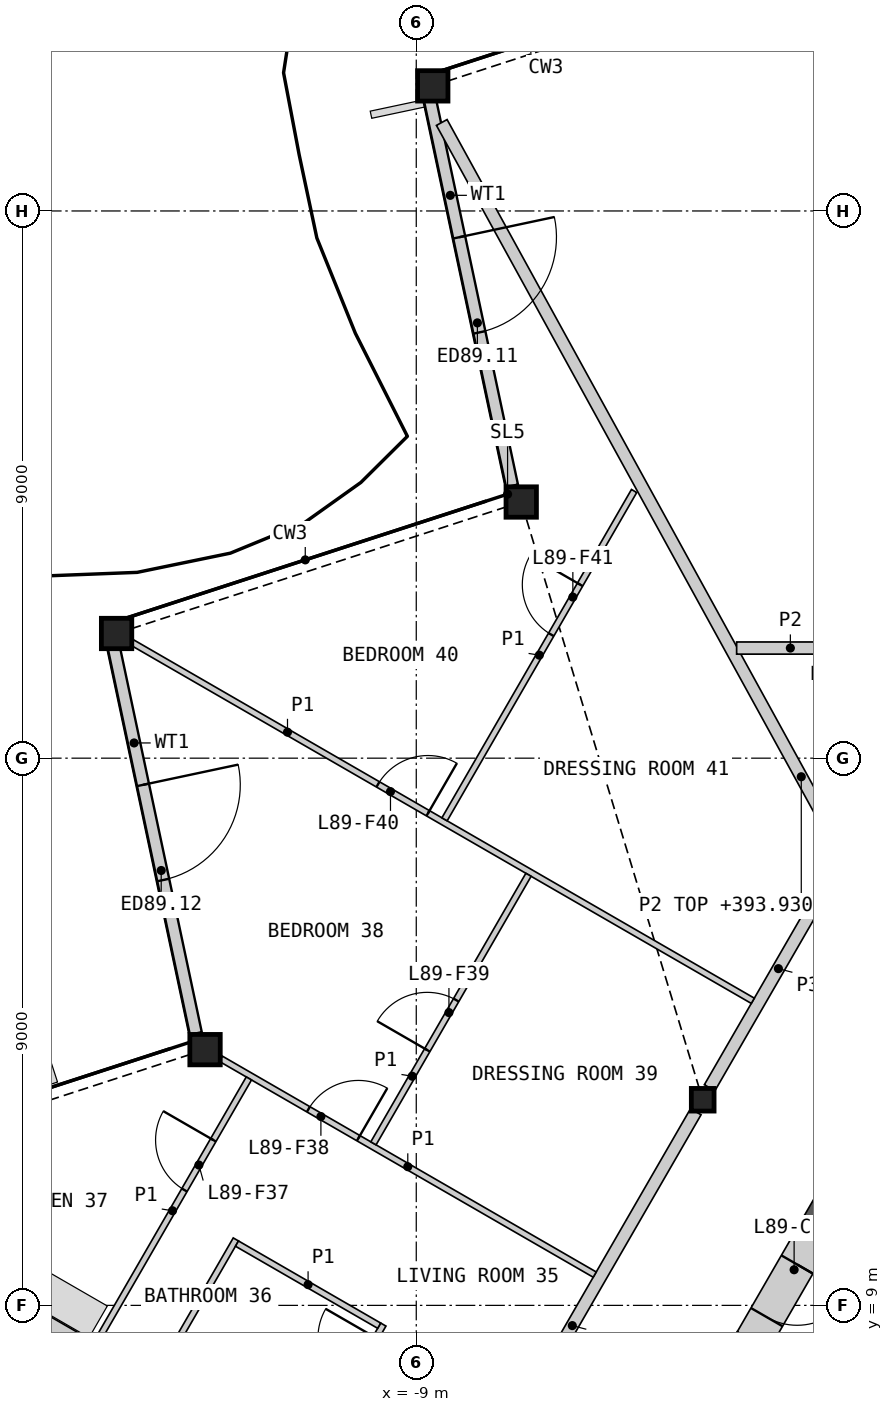
"""IFC4 building model, lengths in metres.
Left out: names, types, materials, properties, quantities, classifications, styles, units other than length and angle.
Written with IfcOpenShell. Run it as: python <this file> out.ifc"""

import sys

from ifc_helpers import new_model, si_unit, direction, frame, frame_2d, origin, origin_2d, place, context, subcontext, project, spatial, rectangle, hollow_rectangle, i_section, extrude, element, fill, save


model = new_model("IFC4")
c1 = context("Model", 3, precision=1e-05, world=origin(), true_north=direction((0.0, 1.0)))
c2 = subcontext(c1, "Body", "Model", "MODEL_VIEW")
j1 = project(units=[si_unit("LENGTHUNIT", "METRE"), si_unit("PLANEANGLEUNIT", "RADIAN")], contexts=[c1])
p1 = place(None, origin())
s1 = spatial("IfcSite", under=j1, at=p1, CompositionType="ELEMENT")
p2 = place(p1, origin())
s2 = spatial("IfcBuilding", under=s1, at=p2, CompositionType="ELEMENT")
p3 = place(p2, frame((0.0, 0.0, 391.6)))
s3 = spatial("IfcBuildingStorey", under=s2, at=p3, CompositionType="ELEMENT", Elevation=391.6)
for number, where, z_axis, x_axis in (
    (1, (-8.729, 29.057, 0.0), (0.0, 0.0, 1.0), (1.0, 0.0, 0.0)),
    (2, (-7.274, 22.213, 0.0), (0.0, 0.0, 1.0), (1.0, 0.0, 0.0)),
    (3, (-13.929, 20.051, 0.0), (0.0, 0.0, 1.0), (1.0, 0.0, 0.0)),
    (4, (-12.474, 13.206, 0.0), (0.0, 0.0, 1.0), (1.0, 0.0, 0.0)),
):
    element("IfcColumn", number, at=place(p3, frame(where, z_axis=z_axis, x_axis=x_axis)), inside=s3, PredefinedType="COLUMN", context=c2, shape_type="SweptSolid", body=[
        extrude(hollow_rectangle(XDim=0.5, YDim=0.5, WallThickness=0.03, at=origin_2d()), origin(), (0.0, 0.0, 1.0), 3.4),
    ])
p4 = place(p3, frame((-4.289, 12.382, 0.0), z_axis=(0.0, 0.0, 1.0), x_axis=(1.0, 0.0, 0.0)))
e5 = element("IfcColumn", 5, at=p4, inside=s3, PredefinedType="COLUMN", context=c2, shape_type="SweptSolid", body=[
    extrude(i_section(OverallWidth=0.374, OverallDepth=0.372, WebThickness=0.016, FlangeThickness=0.026, at=origin_2d()), origin(), (0.0, 0.0, 1.0), 3.4),
])
p5 = place(p3, frame((-8.779, 28.85, 0.0), z_axis=(0.0, 0.0, 1.0), x_axis=(0.207910765171, -0.978147797486, 0.0)))
e6 = element("IfcWall", 6, at=p5, inside=s3, PredefinedType="SOLIDWALL", context=c2, shape_type="SweptSolid", body=[
    extrude(rectangle(XDim=6.512, YDim=0.2, at=frame_2d((3.256, 0.0))), origin(), (0.0, 0.0, 1.0), 2.634),
])
p6 = place(p5, frame((2.333, 0.0, 0.0)))
e7 = element("IfcOpeningElement", 7, at=p6, cuts=e6, PredefinedType="OPENING", context=c2, shape_type="SweptSolid", body=[
    extrude(rectangle(XDim=1.6, YDim=2.25, at=frame_2d((0.8, 1.125))), frame((0.0, 0.11, 0.0), z_axis=(0.0, -1.0, 0.0), x_axis=(1.0, 0.0, 0.0)), (0.0, 0.0, 1.0), 0.22),
])
p7 = place(p3, frame((-13.979, 19.843, 0.0), z_axis=(0.0, 0.0, 1.0), x_axis=(0.207910765171, -0.978147797486, 0.0)))
e8 = element("IfcWall", 8, at=p7, inside=s3, PredefinedType="SOLIDWALL", context=c2, shape_type="SweptSolid", body=[
    extrude(rectangle(XDim=6.512, YDim=0.2, at=frame_2d((3.256, 0.0))), origin(), (0.0, 0.0, 1.0), 2.634),
])
p8 = place(p7, frame((2.333, 0.0, 0.0)))
e9 = element("IfcOpeningElement", 9, at=p8, cuts=e8, PredefinedType="OPENING", context=c2, shape_type="SweptSolid", body=[
    extrude(rectangle(XDim=1.6, YDim=2.25, at=frame_2d((0.8, 1.125))), frame((0.0, 0.11, 0.0), z_axis=(0.0, -1.0, 0.0), x_axis=(1.0, 0.0, 0.0)), (0.0, 0.0, 1.0), 0.22),
])
p9 = place(p3, frame((-3.461, 8.417, 0.0), z_axis=(0.0, 0.0, 1.0), x_axis=(-0.50000391502, -0.866023143435, 0.0)))
e10 = element("IfcWall", 10, at=p9, inside=s3, PredefinedType="SHEAR", context=c2, shape_type="SweptSolid", body=[
    extrude(rectangle(XDim=7.759, YDim=0.6, at=frame_2d((3.879, 0.0))), origin(), (0.0, 0.0, 1.0), 3.1),
])
p10 = place(p3, frame((-1.59, 11.658, 0.0), z_axis=(0.0, 0.0, 1.0), x_axis=(-0.500037594623, -0.866003697431, 0.0)))
e11 = element("IfcWall", 11, at=p10, inside=s3, PredefinedType="SHEAR", context=c2, shape_type="SweptSolid", body=[
    extrude(rectangle(XDim=1.542, YDim=0.6, at=frame_2d((0.771, 0.0))), origin(), (0.0, 0.0, 1.0), 3.1),
])
p11 = place(p3, frame((-2.361, 10.322, 0.0), z_axis=(0.0, 0.0, 1.0), x_axis=(-0.499946605688, -0.86605622881, 0.0)))
e12 = element("IfcWall", 12, at=p11, inside=s3, PredefinedType="SHEAR", context=c2, shape_type="SweptSolid", body=[
    extrude(rectangle(XDim=2.2, YDim=0.6, at=frame_2d((1.1, 0.0))), origin(), (0.0, 0.0, 1.0), 3.1),
])
p12 = place(p11, frame((0.75, 0.0, 0.0)))
e13 = element("IfcOpeningElement", 13, at=p12, cuts=e12, PredefinedType="OPENING", context=c2, shape_type="SweptSolid", body=[
    extrude(rectangle(XDim=1.0, YDim=2.1, at=frame_2d((0.5, 1.05))), frame((0.0, 0.31, 0.0), z_axis=(0.0, -1.0, 0.0), x_axis=(1.0, 0.0, 0.0)), (0.0, 0.0, 1.0), 0.62),
])
p13 = place(p3, frame((-8.465, 5.15, 0.0), z_axis=(0.0, 0.0, 1.0), x_axis=(0.499992155518, 0.866029932751, 0.0)))
e14 = element("IfcWall", 14, at=p13, inside=s3, PredefinedType="PARTITIONING", context=c2, shape_type="SweptSolid", body=[
    extrude(rectangle(XDim=8.123, YDim=0.2, at=frame_2d((4.062, 0.0))), origin(), (0.0, 0.0, 1.0), 3.1),
])
p14 = place(p13, frame((1.956, 0.0, 0.0)))
e15 = element("IfcOpeningElement", 15, at=p14, cuts=e14, PredefinedType="OPENING", context=c2, shape_type="SweptSolid", body=[
    extrude(rectangle(XDim=1.0, YDim=2.1, at=frame_2d((0.5, 1.05))), frame((0.0, 0.11, 0.0), z_axis=(0.0, -1.0, 0.0), x_axis=(1.0, 0.0, 0.0)), (0.0, 0.0, 1.0), 0.22),
])
p15 = place(p3, frame((-18.869, 10.894, 0.0), z_axis=(0.0, 0.0, 1.0), x_axis=(0.866023139795, -0.500003921324, 0.0)))
e16 = element("IfcWall", 16, at=p15, inside=s3, PredefinedType="PARTITIONING", context=c2, shape_type="SweptSolid", body=[
    extrude(rectangle(XDim=6.332, YDim=0.25, at=frame_2d((3.166, 0.0))), origin(), (0.0, 0.0, 1.0), 2.33),
])
p16 = place(p3, frame((-4.176, 12.579, 0.0), z_axis=(0.0, 0.0, 1.0), x_axis=(0.499974648164, 0.866040040179, 0.0)))
e17 = element("IfcWall", 17, at=p16, inside=s3, PredefinedType="PARTITIONING", context=c2, shape_type="SweptSolid", body=[
    extrude(rectangle(XDim=4.525, YDim=0.2, at=frame_2d((2.263, 0.0))), origin(), (0.0, 0.0, 1.0), 3.1),
])
p17 = place(p3, frame((-8.581, 28.455, 0.0), z_axis=(0.0, 0.0, 1.0), x_axis=(0.481551865547, -0.876417594979, 0.0)))
e18 = element("IfcWall", 18, at=p17, inside=s3, PredefinedType="PARTITIONING", context=c2, shape_type="SweptSolid", body=[
    extrude(rectangle(XDim=13.643, YDim=0.2, at=frame_2d((6.821, 0.0))), origin(), (0.0, 0.0, 1.0), 2.33),
])
p18 = place(p3, frame((-3.731, 19.811, 0.0), z_axis=(0.0, 0.0, 1.0), x_axis=(1.0, 0.0, 0.0)))
e19 = element("IfcWall", 19, at=p18, inside=s3, PredefinedType="PARTITIONING", context=c2, shape_type="SweptSolid", body=[
    extrude(rectangle(XDim=3.534, YDim=0.2, at=frame_2d((1.767, 0.0))), origin(), (0.0, 0.0, 1.0), 2.33),
])
p19 = place(p18, frame((1.396, 0.0, 0.0)))
e20 = element("IfcOpeningElement", 20, at=p19, cuts=e19, PredefinedType="OPENING", context=c2, shape_type="SweptSolid", body=[
    extrude(rectangle(XDim=0.95, YDim=2.1, at=frame_2d((0.475, 1.05))), frame((0.0, 0.11, 0.0), z_axis=(0.0, -1.0, 0.0), x_axis=(1.0, 0.0, 0.0)), (0.0, 0.0, 1.0), 0.22),
])
p20 = place(p3, frame((-13.669, 19.9, 0.0), z_axis=(0.0, 0.0, 1.0), x_axis=(0.866032376801, -0.499987922186, 0.0)))
e21 = element("IfcWall", 21, at=p20, inside=s3, PredefinedType="PARTITIONING", context=c2, shape_type="SweptSolid", body=[
    extrude(rectangle(XDim=11.782, YDim=0.1, at=frame_2d((5.891, 0.0))), origin(), (0.0, 0.0, 1.0), 2.33),
])
p21 = place(p20, frame((4.664, 0.0, 0.0)))
e22 = element("IfcOpeningElement", 22, at=p21, cuts=e21, PredefinedType="OPENING", context=c2, shape_type="SweptSolid", body=[
    extrude(rectangle(XDim=0.95, YDim=2.1, at=frame_2d((0.475, 1.05))), frame((0.0, 0.06, 0.0), z_axis=(0.0, -1.0, 0.0), x_axis=(1.0, 0.0, 0.0)), (0.0, 0.0, 1.0), 0.12),
])
p22 = place(p3, frame((-12.214, 13.056, 0.0), z_axis=(0.0, 0.0, 1.0), x_axis=(0.866018949465, -0.500011179042, 0.0)))
e23 = element("IfcWall", 23, at=p22, inside=s3, PredefinedType="PARTITIONING", context=c2, shape_type="SweptSolid", body=[
    extrude(rectangle(XDim=7.1, YDim=0.1, at=frame_2d((3.55, 0.0))), origin(), (0.0, 0.0, 1.0), 2.33),
])
p23 = place(p22, frame((1.663, 0.0, 0.0)))
e24 = element("IfcOpeningElement", 24, at=p23, cuts=e23, PredefinedType="OPENING", context=c2, shape_type="SweptSolid", body=[
    extrude(rectangle(XDim=0.95, YDim=2.1, at=frame_2d((0.475, 1.05))), frame((0.0, 0.06, 0.0), z_axis=(0.0, -1.0, 0.0), x_axis=(1.0, 0.0, 0.0)), (0.0, 0.0, 1.0), 0.12),
])
p24 = place(p3, frame((-8.535, 16.994, 0.0), z_axis=(0.0, 0.0, 1.0), x_axis=(0.499975529996, 0.866039531087, 0.0)))
e25 = element("IfcWall", 25, at=p24, inside=s3, PredefinedType="PARTITIONING", context=c2, shape_type="SweptSolid", body=[
    extrude(rectangle(XDim=6.235, YDim=0.1, at=frame_2d((3.118, 0.0))), origin(), (0.0, 0.0, 1.0), 2.33),
])
p25 = place(p24, frame((3.508, 0.0, 0.0)))
e26 = element("IfcOpeningElement", 26, at=p25, cuts=e25, PredefinedType="OPENING", context=c2, shape_type="SweptSolid", body=[
    extrude(rectangle(XDim=0.95, YDim=2.1, at=frame_2d((0.475, 1.05))), frame((0.0, 0.06, 0.0), z_axis=(0.0, -1.0, 0.0), x_axis=(1.0, 0.0, 0.0)), (0.0, 0.0, 1.0), 0.12),
])
p26 = place(p3, frame((-14.717, 5.321, 0.0), z_axis=(0.0, 0.0, 1.0), x_axis=(0.500015767406, 0.866016300277, 0.0)))
e27 = element("IfcWall", 27, at=p26, inside=s3, PredefinedType="PARTITIONING", context=c2, shape_type="SweptSolid", body=[
    extrude(rectangle(XDim=5.5, YDim=0.1, at=frame_2d((2.75, 0.0))), origin(), (0.0, 0.0, 1.0), 2.33),
])
p27 = place(p3, frame((-12.292, 3.921, 0.0), z_axis=(0.0, 0.0, 1.0), x_axis=(0.499996545922, 0.866027397988, 0.0)))
e28 = element("IfcWall", 28, at=p27, inside=s3, PredefinedType="PARTITIONING", context=c2, shape_type="SweptSolid", body=[
    extrude(rectangle(XDim=5.5, YDim=0.1, at=frame_2d((2.75, 0.0))), origin(), (0.0, 0.0, 1.0), 2.33),
])
p28 = place(p27, frame((4.3, 0.0, 0.0)))
e29 = element("IfcOpeningElement", 29, at=p28, cuts=e28, PredefinedType="OPENING", context=c2, shape_type="SweptSolid", body=[
    extrude(rectangle(XDim=0.95, YDim=2.1, at=frame_2d((0.475, 1.05))), frame((0.0, 0.06, 0.0), z_axis=(0.0, -1.0, 0.0), x_axis=(1.0, 0.0, 0.0)), (0.0, 0.0, 1.0), 0.12),
])
p29 = place(p27, frame((1.465, 0.0, 0.0)))
e30 = element("IfcOpeningElement", 30, at=p29, cuts=e28, PredefinedType="OPENING", context=c2, shape_type="SweptSolid", body=[
    extrude(rectangle(XDim=0.95, YDim=2.1, at=frame_2d((0.475, 1.05))), frame((0.0, 0.06, 0.0), z_axis=(0.0, -1.0, 0.0), x_axis=(1.0, 0.0, 0.0)), (0.0, 0.0, 1.0), 0.12),
])
p30 = place(p3, frame((-9.704, 11.665, 0.0), z_axis=(0.0, 0.0, 1.0), x_axis=(0.499984882974, 0.866034131428, 0.0)))
e31 = element("IfcWall", 31, at=p30, inside=s3, PredefinedType="PARTITIONING", context=c2, shape_type="SweptSolid", body=[
    extrude(rectangle(XDim=5.1, YDim=0.1, at=frame_2d((2.55, 0.0))), origin(), (0.0, 0.0, 1.0), 2.33),
])
p31 = place(p30, frame((1.771, 0.0, 0.0)))
e32 = element("IfcOpeningElement", 32, at=p31, cuts=e31, PredefinedType="OPENING", context=c2, shape_type="SweptSolid", body=[
    extrude(rectangle(XDim=0.95, YDim=2.1, at=frame_2d((0.475, 1.05))), frame((0.0, 0.06, 0.0), z_axis=(0.0, -1.0, 0.0), x_axis=(1.0, 0.0, 0.0)), (0.0, 0.0, 1.0), 0.12),
])
p32 = place(p3, frame((-14.265, 8.38, 0.0), z_axis=(0.0, 0.0, 1.0), x_axis=(0.500026652407, 0.866010015463, 0.0)))
e33 = element("IfcWall", 33, at=p32, inside=s3, PredefinedType="PARTITIONING", context=c2, shape_type="SweptSolid", body=[
    extrude(rectangle(XDim=5.025, YDim=0.1, at=frame_2d((2.513, 0.0))), origin(), (0.0, 0.0, 1.0), 2.33),
])
p33 = place(p32, frame((2.906, 0.0, 0.0)))
e34 = element("IfcOpeningElement", 34, at=p33, cuts=e33, PredefinedType="OPENING", context=c2, shape_type="SweptSolid", body=[
    extrude(rectangle(XDim=0.95, YDim=2.1, at=frame_2d((0.475, 1.05))), frame((0.0, 0.06, 0.0), z_axis=(0.0, -1.0, 0.0), x_axis=(1.0, 0.0, 0.0)), (0.0, 0.0, 1.0), 0.12),
])
p34 = place(p3, frame((-11.948, 10.016, 0.0), z_axis=(0.0, 0.0, 1.0), x_axis=(0.86599734893, -0.500048589285, 0.0)))
e35 = element("IfcWall", 35, at=p34, inside=s3, PredefinedType="PARTITIONING", context=c2, shape_type="SweptSolid", body=[
    extrude(rectangle(XDim=2.7, YDim=0.1, at=frame_2d((1.35, 0.0))), origin(), (0.0, 0.0, 1.0), 2.33),
])
p35 = place(p6, origin())
e36 = element("IfcDoor", 36, at=p35, inside=s3, OperationType="DOUBLE_DOOR_SINGLE_SWING", PredefinedType="DOOR", context=c2, shape_type="SweptSolid", body=[
    extrude(rectangle(XDim=1.6, YDim=2.25, at=frame_2d((0.8, 1.125))), frame((0.0, 0.025, 0.0), z_axis=(0.0, -1.0, 0.0), x_axis=(1.0, 0.0, 0.0)), (0.0, 0.0, 1.0), 0.05),
])
fill(e7, e36)
p36 = place(p8, origin())
e37 = element("IfcDoor", 37, at=p36, inside=s3, OperationType="DOUBLE_DOOR_SINGLE_SWING", PredefinedType="DOOR", context=c2, shape_type="SweptSolid", body=[
    extrude(rectangle(XDim=1.6, YDim=2.25, at=frame_2d((0.8, 1.125))), frame((0.0, 0.025, 0.0), z_axis=(0.0, -1.0, 0.0), x_axis=(1.0, 0.0, 0.0)), (0.0, 0.0, 1.0), 0.05),
])
fill(e9, e37)
p37 = place(p12, origin())
e38 = element("IfcDoor", 38, at=p37, inside=s3, OperationType="SINGLE_SWING_LEFT", PredefinedType="DOOR", context=c2, shape_type="SweptSolid", body=[
    extrude(rectangle(XDim=1.0, YDim=2.1, at=frame_2d((0.5, 1.05))), frame((0.0, 0.055, 0.0), z_axis=(0.0, -1.0, 0.0), x_axis=(1.0, 0.0, 0.0)), (0.0, 0.0, 1.0), 0.05),
])
fill(e13, e38)
p38 = place(p33, origin())
e39 = element("IfcDoor", 39, at=p38, inside=s3, OperationType="SINGLE_SWING_RIGHT", PredefinedType="DOOR", context=c2, shape_type="SweptSolid", body=[
    extrude(rectangle(XDim=0.95, YDim=2.1, at=frame_2d((0.475, 1.05))), frame((0.0, 0.025, 0.0), z_axis=(0.0, -1.0, 0.0), x_axis=(1.0, 0.0, 0.0)), (0.0, 0.0, 1.0), 0.05),
])
fill(e34, e39)
p39 = place(p23, origin())
e40 = element("IfcDoor", 40, at=p39, inside=s3, OperationType="SINGLE_SWING_RIGHT", PredefinedType="DOOR", context=c2, shape_type="SweptSolid", body=[
    extrude(rectangle(XDim=0.95, YDim=2.1, at=frame_2d((0.475, 1.05))), frame((0.0, 0.025, 0.0), z_axis=(0.0, -1.0, 0.0), x_axis=(1.0, 0.0, 0.0)), (0.0, 0.0, 1.0), 0.05),
])
fill(e24, e40)
p40 = place(p31, origin())
e41 = element("IfcDoor", 41, at=p40, inside=s3, OperationType="SINGLE_SWING_LEFT", PredefinedType="DOOR", context=c2, shape_type="SweptSolid", body=[
    extrude(rectangle(XDim=0.95, YDim=2.1, at=frame_2d((0.475, 1.05))), frame((0.0, 0.025, 0.0), z_axis=(0.0, -1.0, 0.0), x_axis=(1.0, 0.0, 0.0)), (0.0, 0.0, 1.0), 0.05),
])
fill(e32, e41)
p41 = place(p21, origin())
e42 = element("IfcDoor", 42, at=p41, inside=s3, OperationType="SINGLE_SWING_RIGHT", PredefinedType="DOOR", context=c2, shape_type="SweptSolid", body=[
    extrude(rectangle(XDim=0.95, YDim=2.1, at=frame_2d((0.475, 1.05))), frame((0.0, 0.025, 0.0), z_axis=(0.0, -1.0, 0.0), x_axis=(1.0, 0.0, 0.0)), (0.0, 0.0, 1.0), 0.05),
])
fill(e22, e42)
p42 = place(p25, origin())
e43 = element("IfcDoor", 43, at=p42, inside=s3, OperationType="SINGLE_SWING_RIGHT", PredefinedType="DOOR", context=c2, shape_type="SweptSolid", body=[
    extrude(rectangle(XDim=0.95, YDim=2.1, at=frame_2d((0.475, 1.05))), frame((0.0, 0.025, 0.0), z_axis=(0.0, -1.0, 0.0), x_axis=(1.0, 0.0, 0.0)), (0.0, 0.0, 1.0), 0.05),
])
fill(e26, e43)
save(model, sys.argv[1])
